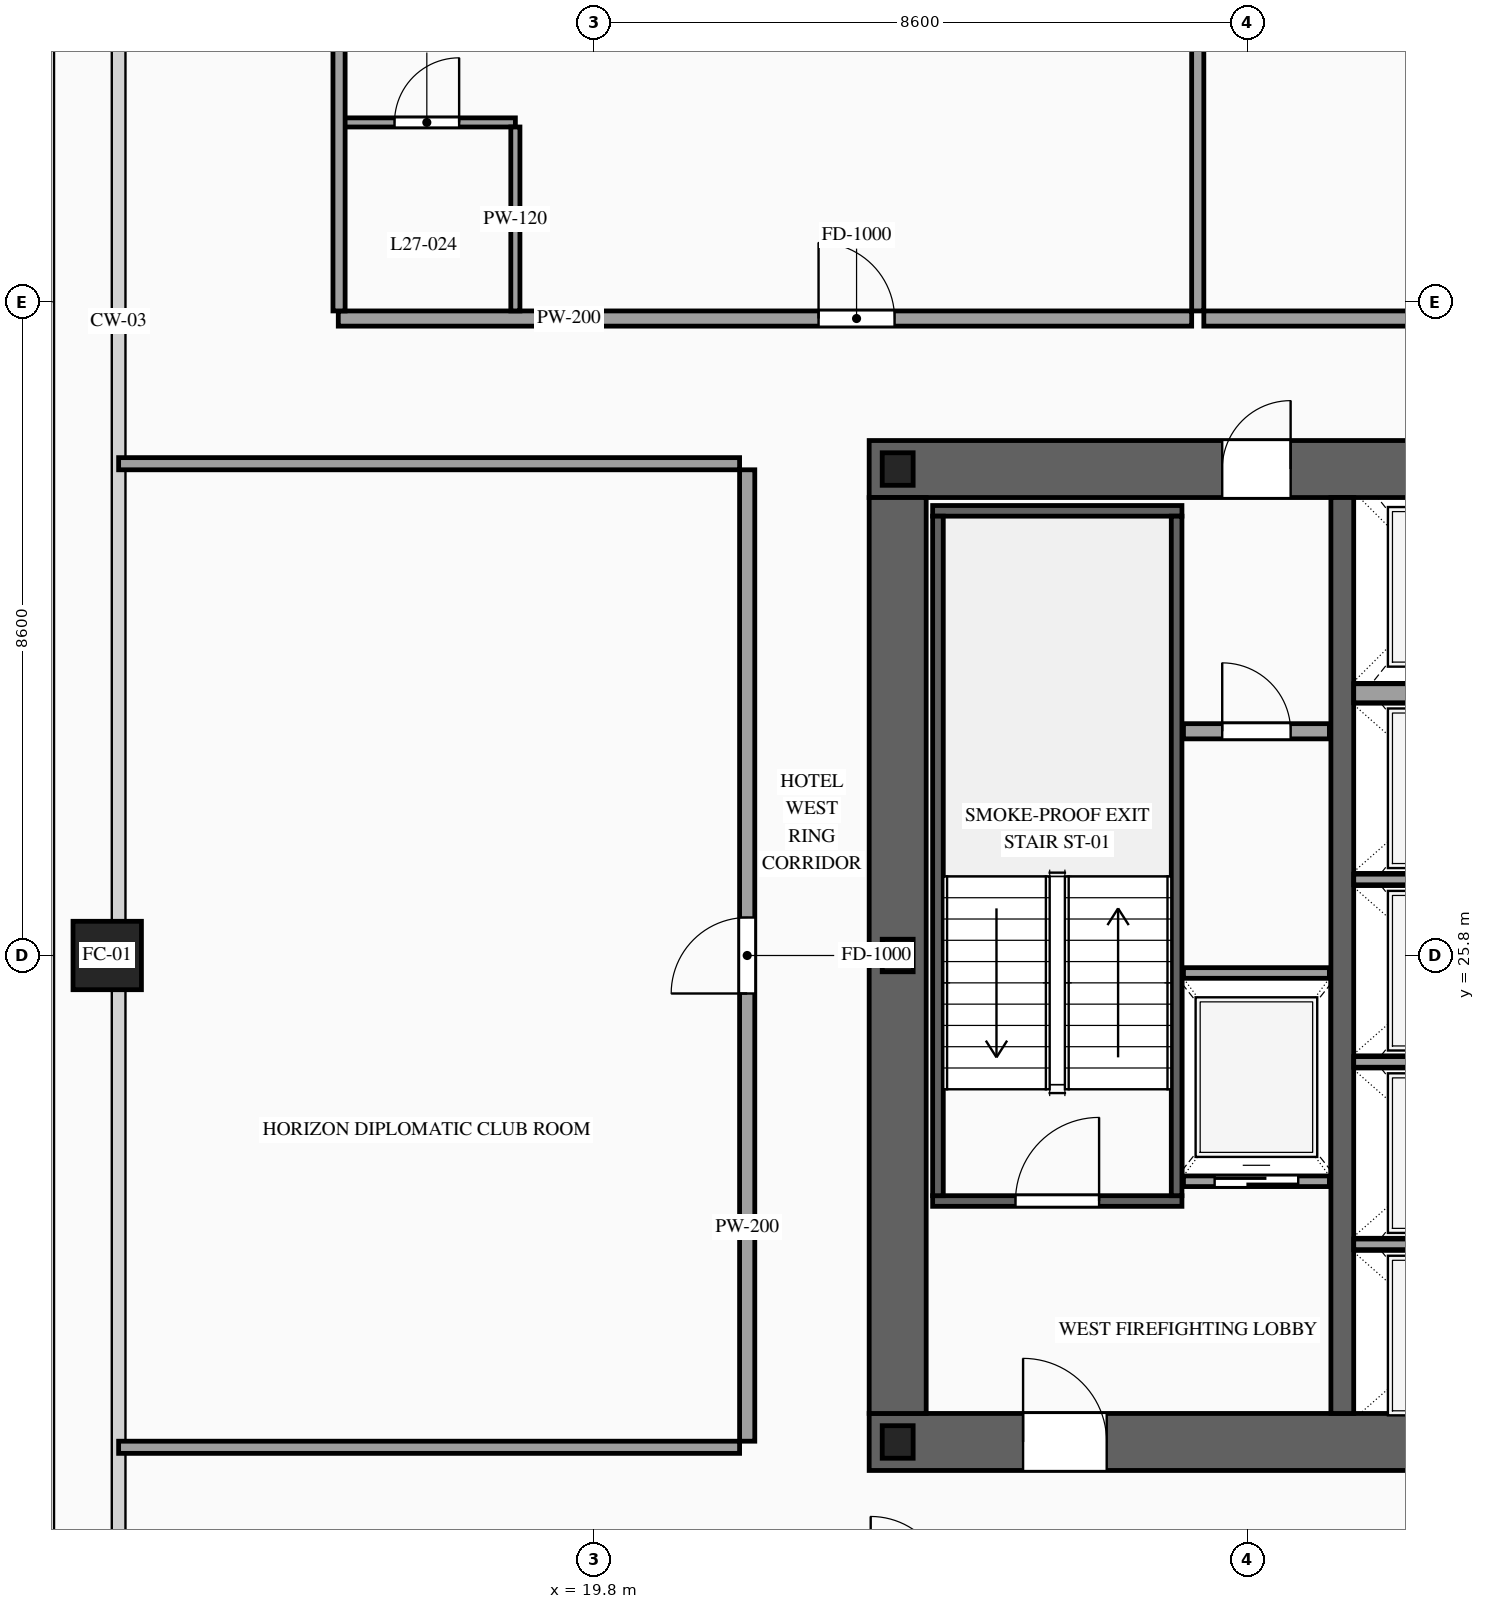
"""IFC4 building model, lengths in metres.
Left out: names, types, materials, properties, quantities, classifications, styles, units other than length and angle.
Written with IfcOpenShell. Run it as: python <this file> out.ifc"""

import sys

from ifc_helpers import new_model, si_unit, direction, frame, frame_2d, origin, origin_2d, place, context, subcontext, project, spatial, rectangle, hollow_rectangle, i_section, extrude, source, transform, mapped, element, fill, save


model = new_model("IFC4")
c1 = context("Model", 3, precision=1e-05, world=origin(), true_north=direction((0.0, 1.0)))
c2 = subcontext(c1, "Body", "Model", "MODEL_VIEW")
j1 = project(units=[si_unit("LENGTHUNIT", "METRE"), si_unit("PLANEANGLEUNIT", "RADIAN")], contexts=[c1])
p1 = place(None, origin())
s1 = spatial("IfcSite", under=j1, at=p1, CompositionType="ELEMENT")
p2 = place(p1, origin())
s2 = spatial("IfcBuilding", under=s1, at=p2, CompositionType="ELEMENT")
p3 = place(p2, frame((0.0, 0.0, 104.6)))
s3 = spatial("IfcBuildingStorey", under=s2, at=p3, CompositionType="ELEMENT", Elevation=104.6)
p4 = place(p3, frame((23.425, 19.4, 0.0), z_axis=(0.0, 0.0, 1.0), x_axis=(1.0, 0.0, 0.0)))
e1 = element("IfcWall", 1, at=p4, inside=s3, PredefinedType="SHEAR", context=c2, shape_type="SweptSolid", body=[
    extrude(rectangle(XDim=27.15, YDim=0.75, at=frame_2d((13.575, 0.0))), origin(), (0.0, 0.0, 1.0), 3.6),
])
p5 = place(p4, frame((2.025, 0.0, 0.0)))
e2 = element("IfcOpeningElement", 2, at=p5, cuts=e1, PredefinedType="OPENING", context=c2, shape_type="SweptSolid", body=[
    extrude(rectangle(XDim=1.1, YDim=2.2, at=frame_2d((0.55, 1.1))), frame((0.0, 0.39, 0.0), z_axis=(0.0, -1.0, 0.0), x_axis=(1.0, 0.0, 0.0)), (0.0, 0.0, 1.0), 0.78),
])
p6 = place(p4, frame((9.925, 0.0, 0.0)))
e3 = element("IfcOpeningElement", 3, at=p6, cuts=e1, PredefinedType="OPENING", context=c2, shape_type="SweptSolid", body=[
    extrude(rectangle(XDim=1.1, YDim=2.2, at=frame_2d((0.55, 1.1))), frame((0.0, 0.39, 0.0), z_axis=(0.0, -1.0, 0.0), x_axis=(1.0, 0.0, 0.0)), (0.0, 0.0, 1.0), 0.78),
])
p7 = place(p4, frame((23.125, 0.0, 0.0)))
e4 = element("IfcOpeningElement", 4, at=p7, cuts=e1, PredefinedType="OPENING", context=c2, shape_type="SweptSolid", body=[
    extrude(rectangle(XDim=1.1, YDim=2.2, at=frame_2d((0.55, 1.1))), frame((0.0, 0.39, 0.0), z_axis=(0.0, -1.0, 0.0), x_axis=(1.0, 0.0, 0.0)), (0.0, 0.0, 1.0), 0.78),
])
p8 = place(p4, frame((19.745, 0.0, 0.0)))
e5 = element("IfcOpeningElement", 5, at=p8, cuts=e1, PredefinedType="OPENING", context=c2, shape_type="SweptSolid", body=[
    extrude(rectangle(XDim=0.9, YDim=2.15, at=frame_2d((0.45, 1.075))), frame((0.0, 0.39, 0.0), z_axis=(0.0, -1.0, 0.0), x_axis=(1.0, 0.0, 0.0)), (0.0, 0.0, 1.0), 0.78),
])
p9 = place(p4, frame((18.305, 0.0, 0.0)))
e6 = element("IfcOpeningElement", 6, at=p9, cuts=e1, PredefinedType="OPENING", context=c2, shape_type="SweptSolid", body=[
    extrude(rectangle(XDim=0.9, YDim=2.15, at=frame_2d((0.45, 1.075))), frame((0.0, 0.39, 0.0), z_axis=(0.0, -1.0, 0.0), x_axis=(1.0, 0.0, 0.0)), (0.0, 0.0, 1.0), 0.78),
])
p10 = place(p3, frame((23.425, 32.2, 0.0), z_axis=(0.0, 0.0, 1.0), x_axis=(1.0, 0.0, 0.0)))
e7 = element("IfcWall", 7, at=p10, inside=s3, PredefinedType="SHEAR", context=c2, shape_type="SweptSolid", body=[
    extrude(rectangle(XDim=27.15, YDim=0.75, at=frame_2d((13.575, 0.0))), origin(), (0.0, 0.0, 1.0), 3.6),
])
p11 = place(p10, frame((4.645, 0.0, 0.0)))
e8 = element("IfcOpeningElement", 8, at=p11, cuts=e7, PredefinedType="OPENING", context=c2, shape_type="SweptSolid", body=[
    extrude(rectangle(XDim=0.9, YDim=2.15, at=frame_2d((0.45, 1.075))), frame((0.0, 0.39, 0.0), z_axis=(0.0, -1.0, 0.0), x_axis=(1.0, 0.0, 0.0)), (0.0, 0.0, 1.0), 0.78),
])
p12 = place(p10, frame((9.925, 0.0, 0.0)))
e9 = element("IfcOpeningElement", 9, at=p12, cuts=e7, PredefinedType="OPENING", context=c2, shape_type="SweptSolid", body=[
    extrude(rectangle(XDim=1.1, YDim=2.2, at=frame_2d((0.55, 1.1))), frame((0.0, 0.39, 0.0), z_axis=(0.0, -1.0, 0.0), x_axis=(1.0, 0.0, 0.0)), (0.0, 0.0, 1.0), 0.78),
])
p13 = place(p10, frame((15.775, 0.0, 0.0)))
e10 = element("IfcOpeningElement", 10, at=p13, cuts=e7, PredefinedType="OPENING", context=c2, shape_type="SweptSolid", body=[
    extrude(rectangle(XDim=1.1, YDim=2.2, at=frame_2d((0.55, 1.1))), frame((0.0, 0.39, 0.0), z_axis=(0.0, -1.0, 0.0), x_axis=(1.0, 0.0, 0.0)), (0.0, 0.0, 1.0), 0.78),
])
p14 = place(p10, frame((19.745, 0.0, 0.0)))
e11 = element("IfcOpeningElement", 11, at=p14, cuts=e7, PredefinedType="OPENING", context=c2, shape_type="SweptSolid", body=[
    extrude(rectangle(XDim=0.9, YDim=2.15, at=frame_2d((0.45, 1.075))), frame((0.0, 0.39, 0.0), z_axis=(0.0, -1.0, 0.0), x_axis=(1.0, 0.0, 0.0)), (0.0, 0.0, 1.0), 0.78),
])
m1 = source(origin(), c2, "Body", "SweptSolid", [
    extrude(rectangle(XDim=12.05, YDim=0.75, at=frame_2d((6.025, 0.0))), origin(), (0.0, 0.0, 1.0), 3.6),
])
p15 = place(p3, frame((23.8, 19.775, 0.0), z_axis=(0.0, 0.0, 1.0), x_axis=(0.0, 1.0, 0.0)))
e12 = element("IfcWall", 12, at=p15, inside=s3, PredefinedType="SHEAR", context=c2, shape_type="MappedRepresentation", body=[
    mapped(m1, transform((0.0, 0.0, 0.0), scale=1.0)),
])
m2 = source(origin(), c2, "Body", "SweptSolid", [
    extrude(rectangle(XDim=12.05, YDim=0.3, at=frame_2d((6.025, 0.0))), origin(), (0.0, 0.0, 1.0), 3.6),
])
p16 = place(p3, frame((29.65, 19.775, 0.0), z_axis=(0.0, 0.0, 1.0), x_axis=(0.0, 1.0, 0.0)))
e13 = element("IfcWall", 13, at=p16, inside=s3, PredefinedType="SOLIDWALL", context=c2, shape_type="MappedRepresentation", body=[
    mapped(m2, transform((0.0, 0.0, 0.0), scale=1.0)),
])
m3 = source(origin(), c2, "Body", "SweptSolid", [
    extrude(i_section(OverallWidth=0.407, OverallDepth=0.428, WebThickness=0.02, FlangeThickness=0.035, at=origin_2d()), origin(), (0.0, 0.0, 1.0), 3.6),
])
for number, where, z_axis, x_axis in (
    (14, (23.8, 19.4, 0.0), (0.0, 0.0, 1.0), (1.0, 0.0, 0.0)),
    (15, (23.8, 25.8, 0.0), (0.0, 0.0, 1.0), (1.0, 0.0, 0.0)),
    (16, (23.8, 32.2, 0.0), (0.0, 0.0, 1.0), (1.0, 0.0, 0.0)),
):
    element("IfcColumn", number, at=place(p3, frame(where, z_axis=z_axis, x_axis=x_axis)), inside=s3, PredefinedType="COLUMN", context=c2, shape_type="MappedRepresentation", body=[
        mapped(m3, transform((0.0, 0.0, 0.0), scale=1.0)),
    ])
m4 = source(origin(), c2, "Body", "SweptSolid", [
    extrude(hollow_rectangle(XDim=0.9, YDim=0.9, WallThickness=0.042, at=origin_2d()), origin(), (0.0, 0.0, 1.0), 3.6),
])
p17 = place(p3, frame((13.4, 25.8, 0.0), z_axis=(0.0, 0.0, 1.0), x_axis=(1.0, 0.0, 0.0)))
e17 = element("IfcColumn", 17, at=p17, inside=s3, PredefinedType="COLUMN", context=c2, shape_type="MappedRepresentation", body=[
    mapped(m4, transform((0.0, 0.0, 0.0), scale=1.0)),
])
p18 = place(p3, frame((27.56, 22.83, 0.0), z_axis=(0.0, 0.0, 1.0), x_axis=(1.0, 0.0, 0.0)))
e18 = element("IfcWall", 18, at=p18, inside=s3, PredefinedType="SOLIDWALL", context=c2, shape_type="SweptSolid", body=[
    extrude(rectangle(XDim=1.92, YDim=0.14, at=frame_2d((0.96, 0.0))), origin(), (0.0, 0.0, 1.0), 3.38),
])
p19 = place(p18, frame((0.41, 0.0, 0.0)))
e19 = element("IfcOpeningElement", 19, at=p19, cuts=e18, PredefinedType="OPENING", context=c2, shape_type="SweptSolid", body=[
    extrude(rectangle(XDim=1.1, YDim=2.2, at=frame_2d((0.55, 1.1))), frame((0.0, 0.085, 0.0), z_axis=(0.0, -1.0, 0.0), x_axis=(1.0, 0.0, 0.0)), (0.0, 0.0, 1.0), 0.17),
])
m5 = source(origin(), c2, "Body", "SweptSolid", [
    extrude(rectangle(XDim=1.92, YDim=0.14, at=frame_2d((0.96, 0.0))), origin(), (0.0, 0.0, 1.0), 3.38),
])
p20 = place(p3, frame((27.56, 25.57, 0.0), z_axis=(0.0, 0.0, 1.0), x_axis=(1.0, 0.0, 0.0)))
e20 = element("IfcWall", 20, at=p20, inside=s3, PredefinedType="SOLIDWALL", context=c2, shape_type="MappedRepresentation", body=[
    mapped(m5, transform((0.0, 0.0, 0.0), scale=1.0)),
])
m6 = source(origin(), c2, "Body", "SweptSolid", [
    extrude(rectangle(XDim=2.5, YDim=0.14, at=frame_2d((1.25, 0.0))), origin(), (0.0, 0.0, 1.0), 3.38),
])
for number, where, z_axis, x_axis in (
    (21, (29.8, 22.0, 0.0), (0.0, 0.0, 1.0), (1.0, 0.0, 0.0)),
    (22, (29.8, 24.4, 0.0), (0.0, 0.0, 1.0), (1.0, 0.0, 0.0)),
    (23, (29.8, 26.8, 0.0), (0.0, 0.0, 1.0), (1.0, 0.0, 0.0)),
):
    element("IfcWall", number, at=place(p3, frame(where, z_axis=z_axis, x_axis=x_axis)), inside=s3, PredefinedType="SOLIDWALL", context=c2, shape_type="MappedRepresentation", body=[
        mapped(m6, transform((0.0, 0.0, 0.0), scale=1.0)),
    ])
m7 = source(origin(), c2, "Body", "SweptSolid", [
    extrude(rectangle(XDim=2.5, YDim=0.25, at=frame_2d((1.25, 0.0))), origin(), (0.0, 0.0, 1.0), 3.38),
])
p21 = place(p3, frame((29.8, 29.25, 0.0), z_axis=(0.0, 0.0, 1.0), x_axis=(1.0, 0.0, 0.0)))
e24 = element("IfcWall", 24, at=p21, inside=s3, PredefinedType="SOLIDWALL", context=c2, shape_type="MappedRepresentation", body=[
    mapped(m7, transform((0.0, 0.0, 0.0), scale=1.0)),
])
p22 = place(p3, frame((24.26, 22.57, 0.0), z_axis=(0.0, 0.0, 1.0), x_axis=(1.0, 0.0, 0.0)))
e25 = element("IfcWall", 25, at=p22, inside=s3, PredefinedType="SOLIDWALL", context=c2, shape_type="SweptSolid", body=[
    extrude(rectangle(XDim=3.28, YDim=0.14, at=frame_2d((1.64, 0.0))), origin(), (0.0, 0.0, 1.0), 3.38),
])
p23 = place(p22, frame((1.09, 0.0, 0.0)))
e26 = element("IfcOpeningElement", 26, at=p23, cuts=e25, PredefinedType="OPENING", context=c2, shape_type="SweptSolid", body=[
    extrude(rectangle(XDim=1.1, YDim=2.2, at=frame_2d((0.55, 1.1))), frame((0.0, 0.085, 0.0), z_axis=(0.0, -1.0, 0.0), x_axis=(1.0, 0.0, 0.0)), (0.0, 0.0, 1.0), 0.17),
])
m8 = source(origin(), c2, "Body", "SweptSolid", [
    extrude(rectangle(XDim=3.28, YDim=0.14, at=frame_2d((1.64, 0.0))), origin(), (0.0, 0.0, 1.0), 3.38),
])
p24 = place(p3, frame((24.26, 31.65, 0.0), z_axis=(0.0, 0.0, 1.0), x_axis=(1.0, 0.0, 0.0)))
e27 = element("IfcWall", 27, at=p24, inside=s3, PredefinedType="SOLIDWALL", context=c2, shape_type="MappedRepresentation", body=[
    mapped(m8, transform((0.0, 0.0, 0.0), scale=1.0)),
])
m9 = source(origin(), c2, "Body", "SweptSolid", [
    extrude(rectangle(XDim=8.94, YDim=0.14, at=frame_2d((4.47, 0.0))), origin(), (0.0, 0.0, 1.0), 3.38),
])
for number, where, z_axis, x_axis in (
    (28, (24.33, 22.64, 0.0), (0.0, 0.0, 1.0), (0.0, 1.0, 0.0)),
    (29, (27.47, 22.64, 0.0), (0.0, 0.0, 1.0), (0.0, 1.0, 0.0)),
):
    element("IfcWall", number, at=place(p3, frame(where, z_axis=z_axis, x_axis=x_axis)), inside=s3, PredefinedType="SOLIDWALL", context=c2, shape_type="MappedRepresentation", body=[
        mapped(m9, transform((0.0, 0.0, 0.0), scale=1.0)),
    ])
p25 = place(p3, frame((27.56, 28.75, 0.0), z_axis=(0.0, 0.0, 1.0), x_axis=(1.0, 0.0, 0.0)))
e30 = element("IfcWall", 30, at=p25, inside=s3, PredefinedType="PARTITIONING", context=c2, shape_type="SweptSolid", body=[
    extrude(rectangle(XDim=1.92, YDim=0.2, at=frame_2d((0.96, 0.0))), origin(), (0.0, 0.0, 1.0), 3.38),
])
p26 = place(p25, frame((0.51, 0.0, 0.0)))
e31 = element("IfcOpeningElement", 31, at=p26, cuts=e30, PredefinedType="OPENING", context=c2, shape_type="SweptSolid", body=[
    extrude(rectangle(XDim=0.9, YDim=2.15, at=frame_2d((0.45, 1.075))), frame((0.0, 0.115, 0.0), z_axis=(0.0, -1.0, 0.0), x_axis=(1.0, 0.0, 0.0)), (0.0, 0.0, 1.0), 0.23),
])
p27 = place(p3, frame((16.44, 34.18, 0.0), z_axis=(0.0, 0.0, 1.0), x_axis=(1.0, 0.0, 0.0)))
e32 = element("IfcWall", 32, at=p27, inside=s3, PredefinedType="PARTITIONING", context=c2, shape_type="SweptSolid", body=[
    extrude(rectangle(XDim=11.228, YDim=0.2, at=frame_2d((5.614, 0.0))), origin(), (0.0, 0.0, 1.0), 3.38),
])
p28 = place(p27, frame((6.319, 0.0, 0.0)))
e33 = element("IfcOpeningElement", 33, at=p28, cuts=e32, PredefinedType="OPENING", context=c2, shape_type="SweptSolid", body=[
    extrude(rectangle(XDim=1.0, YDim=2.2, at=frame_2d((0.5, 1.1))), frame((0.0, 0.115, 0.0), z_axis=(0.0, -1.0, 0.0), x_axis=(1.0, 0.0, 0.0)), (0.0, 0.0, 1.0), 0.23),
])
m10 = source(origin(), c2, "Body", "SweptSolid", [
    extrude(rectangle(XDim=14.97, YDim=0.16, at=frame_2d((7.485, 0.0))), origin(), (0.0, 0.0, 1.0), 3.38),
])
p29 = place(p3, frame((27.748, 34.28, 0.0), z_axis=(0.0, 0.0, 1.0), x_axis=(0.0, 1.0, 0.0)))
e34 = element("IfcWall", 34, at=p29, inside=s3, PredefinedType="PARTITIONING", context=c2, shape_type="MappedRepresentation", body=[
    mapped(m10, transform((0.0, 0.0, 0.0), scale=1.0)),
])
p30 = place(p3, frame((16.44, 36.76, 0.0), z_axis=(0.0, 0.0, 1.0), x_axis=(1.0, 0.0, 0.0)))
e35 = element("IfcWall", 35, at=p30, inside=s3, PredefinedType="PARTITIONING", context=c2, shape_type="SweptSolid", body=[
    extrude(rectangle(XDim=2.33, YDim=0.12, at=frame_2d((1.165, 0.0))), origin(), (0.0, 0.0, 1.0), 3.38),
])
p31 = place(p30, frame((0.74, 0.0, 0.0)))
e36 = element("IfcOpeningElement", 36, at=p31, cuts=e35, PredefinedType="OPENING", context=c2, shape_type="SweptSolid", body=[
    extrude(rectangle(XDim=0.85, YDim=2.1, at=frame_2d((0.425, 1.05))), frame((0.0, 0.075, 0.0), z_axis=(0.0, -1.0, 0.0), x_axis=(1.0, 0.0, 0.0)), (0.0, 0.0, 1.0), 0.15),
])
m11 = source(origin(), c2, "Body", "SweptSolid", [
    extrude(rectangle(XDim=2.42, YDim=0.12, at=frame_2d((1.21, 0.0))), origin(), (0.0, 0.0, 1.0), 3.38),
])
p32 = place(p3, frame((18.77, 34.28, 0.0), z_axis=(0.0, 0.0, 1.0), x_axis=(0.0, 1.0, 0.0)))
e37 = element("IfcWall", 37, at=p32, inside=s3, PredefinedType="PARTITIONING", context=c2, shape_type="MappedRepresentation", body=[
    mapped(m11, transform((0.0, 0.0, 0.0), scale=1.0)),
])
p33 = place(p3, frame((27.828, 34.18, 0.0), z_axis=(0.0, 0.0, 1.0), x_axis=(1.0, 0.0, 0.0)))
e38 = element("IfcWall", 38, at=p33, inside=s3, PredefinedType="PARTITIONING", context=c2, shape_type="SweptSolid", body=[
    extrude(rectangle(XDim=9.092, YDim=0.2, at=frame_2d((4.546, 0.0))), origin(), (0.0, 0.0, 1.0), 3.38),
])
p34 = place(p33, frame((4.046, 0.0, 0.0)))
e39 = element("IfcOpeningElement", 39, at=p34, cuts=e38, PredefinedType="OPENING", context=c2, shape_type="SweptSolid", body=[
    extrude(rectangle(XDim=1.0, YDim=2.2, at=frame_2d((0.5, 1.1))), frame((0.0, 0.115, 0.0), z_axis=(0.0, -1.0, 0.0), x_axis=(1.0, 0.0, 0.0)), (0.0, 0.0, 1.0), 0.23),
])
m12 = source(origin(), c2, "Body", "SweptSolid", [
    extrude(rectangle(XDim=14.82, YDim=0.16, at=frame_2d((7.41, 0.0))), origin(), (0.0, 0.0, 1.0), 3.38),
])
p35 = place(p3, frame((16.45, 34.28, 0.0), z_axis=(0.0, 0.0, 1.0), x_axis=(0.0, 1.0, 0.0)))
e40 = element("IfcWall", 40, at=p35, inside=s3, PredefinedType="PARTITIONING", context=c2, shape_type="MappedRepresentation", body=[
    mapped(m12, transform((0.0, 0.0, 0.0), scale=1.0)),
])
p36 = place(p3, frame((21.82, 19.41, 0.0), z_axis=(0.0, 0.0, 1.0), x_axis=(0.0, 1.0, 0.0)))
e41 = element("IfcWall", 41, at=p36, inside=s3, PredefinedType="PARTITIONING", context=c2, shape_type="SweptSolid", body=[
    extrude(rectangle(XDim=12.78, YDim=0.2, at=frame_2d((6.39, 0.0))), origin(), (0.0, 0.0, 1.0), 3.38),
])
p37 = place(p36, frame((5.89, 0.0, 0.0)))
e42 = element("IfcOpeningElement", 42, at=p37, cuts=e41, PredefinedType="OPENING", context=c2, shape_type="SweptSolid", body=[
    extrude(rectangle(XDim=1.0, YDim=2.2, at=frame_2d((0.5, 1.1))), frame((0.0, 0.115, 0.0), z_axis=(0.0, -1.0, 0.0), x_axis=(1.0, 0.0, 0.0)), (0.0, 0.0, 1.0), 0.23),
])
m13 = source(origin(), c2, "Body", "SweptSolid", [
    extrude(rectangle(XDim=8.17, YDim=0.16, at=frame_2d((4.085, 0.0))), origin(), (0.0, 0.0, 1.0), 2.875),
])
for number, where, z_axis, x_axis in (
    (43, (13.55, 19.33, 0.0), (0.0, 0.0, 1.0), (1.0, 0.0, 0.0)),
    (44, (13.55, 32.27, 0.0), (0.0, 0.0, 1.0), (1.0, 0.0, 0.0)),
):
    element("IfcWall", number, at=place(p3, frame(where, z_axis=z_axis, x_axis=x_axis)), inside=s3, PredefinedType="PARTITIONING", context=c2, shape_type="MappedRepresentation", body=[
        mapped(m13, transform((0.0, 0.0, 0.0), scale=1.0)),
    ])
m14 = source(origin(), c2, "Body", "SweptSolid", [
    extrude(rectangle(XDim=1.1, YDim=2.2, at=frame_2d((0.55, 1.1))), frame((0.0, 0.025, 0.0), z_axis=(0.0, -1.0, 0.0), x_axis=(1.0, 0.0, 0.0)), (0.0, 0.0, 1.0), 0.05),
])
p38 = place(p19, origin())
e45 = element("IfcDoor", 45, at=p38, inside=s3, OperationType="SLIDING_TO_LEFT", PredefinedType="DOOR", context=c2, shape_type="MappedRepresentation", body=[
    mapped(m14, transform((0.0, 0.0, 0.0), scale=1.0)),
])
fill(e19, e45)
m15 = source(origin(), c2, "Body", "SweptSolid", [
    extrude(rectangle(XDim=1.1, YDim=2.2, at=frame_2d((0.55, 1.1))), frame((0.0, 0.025, 0.0), z_axis=(0.0, -1.0, 0.0), x_axis=(1.0, 0.0, 0.0)), (0.0, 0.0, 1.0), 0.05),
])
p39 = place(p23, origin())
e46 = element("IfcDoor", 46, at=p39, inside=s3, OperationType="SINGLE_SWING_RIGHT", PredefinedType="DOOR", context=c2, shape_type="MappedRepresentation", body=[
    mapped(m15, transform((0.0, 0.0, 0.0), scale=1.0)),
])
fill(e26, e46)
p40 = place(p5, origin())
e47 = element("IfcDoor", 47, at=p40, inside=s3, OperationType="SINGLE_SWING_LEFT", PredefinedType="DOOR", context=c2, shape_type="MappedRepresentation", body=[
    mapped(m15, transform((0.0, 0.0, 0.0), scale=1.0)),
])
fill(e2, e47)
m16 = source(origin(), c2, "Body", "SweptSolid", [
    extrude(rectangle(XDim=0.9, YDim=2.15, at=frame_2d((0.45, 1.075))), frame((0.0, 0.025, 0.0), z_axis=(0.0, -1.0, 0.0), x_axis=(1.0, 0.0, 0.0)), (0.0, 0.0, 1.0), 0.05),
])
p41 = place(p11, origin())
e48 = element("IfcDoor", 48, at=p41, inside=s3, OperationType="SINGLE_SWING_RIGHT", PredefinedType="DOOR", context=c2, shape_type="MappedRepresentation", body=[
    mapped(m16, transform((0.0, 0.0, 0.0), scale=1.0)),
])
fill(e8, e48)
p42 = place(p26, origin())
e49 = element("IfcDoor", 49, at=p42, inside=s3, OperationType="SINGLE_SWING_LEFT", PredefinedType="DOOR", context=c2, shape_type="MappedRepresentation", body=[
    mapped(m16, transform((0.0, 0.0, 0.0), scale=1.0)),
])
fill(e31, e49)
m17 = source(origin(), c2, "Body", "SweptSolid", [
    extrude(rectangle(XDim=1.0, YDim=2.2, at=frame_2d((0.5, 1.1))), frame((0.0, 0.025, 0.0), z_axis=(0.0, -1.0, 0.0), x_axis=(1.0, 0.0, 0.0)), (0.0, 0.0, 1.0), 0.05),
])
p43 = place(p28, origin())
e50 = element("IfcDoor", 50, at=p43, inside=s3, OperationType="SINGLE_SWING_LEFT", PredefinedType="DOOR", context=c2, shape_type="MappedRepresentation", body=[
    mapped(m17, transform((0.0, 0.0, 0.0), scale=1.0)),
])
fill(e33, e50)
m18 = source(origin(), c2, "Body", "SweptSolid", [
    extrude(rectangle(XDim=0.85, YDim=2.1, at=frame_2d((0.425, 1.05))), frame((0.0, 0.025, 0.0), z_axis=(0.0, -1.0, 0.0), x_axis=(1.0, 0.0, 0.0)), (0.0, 0.0, 1.0), 0.05),
])
p44 = place(p31, origin())
e51 = element("IfcDoor", 51, at=p44, inside=s3, OperationType="SINGLE_SWING_RIGHT", PredefinedType="DOOR", context=c2, shape_type="MappedRepresentation", body=[
    mapped(m18, transform((0.0, 0.0, 0.0), scale=1.0)),
])
fill(e36, e51)
p45 = place(p37, origin())
e52 = element("IfcDoor", 52, at=p45, inside=s3, OperationType="SINGLE_SWING_LEFT", PredefinedType="DOOR", context=c2, shape_type="MappedRepresentation", body=[
    mapped(m17, transform((0.0, 0.0, 0.0), scale=1.0)),
])
fill(e42, e52)
save(model, sys.argv[1])
